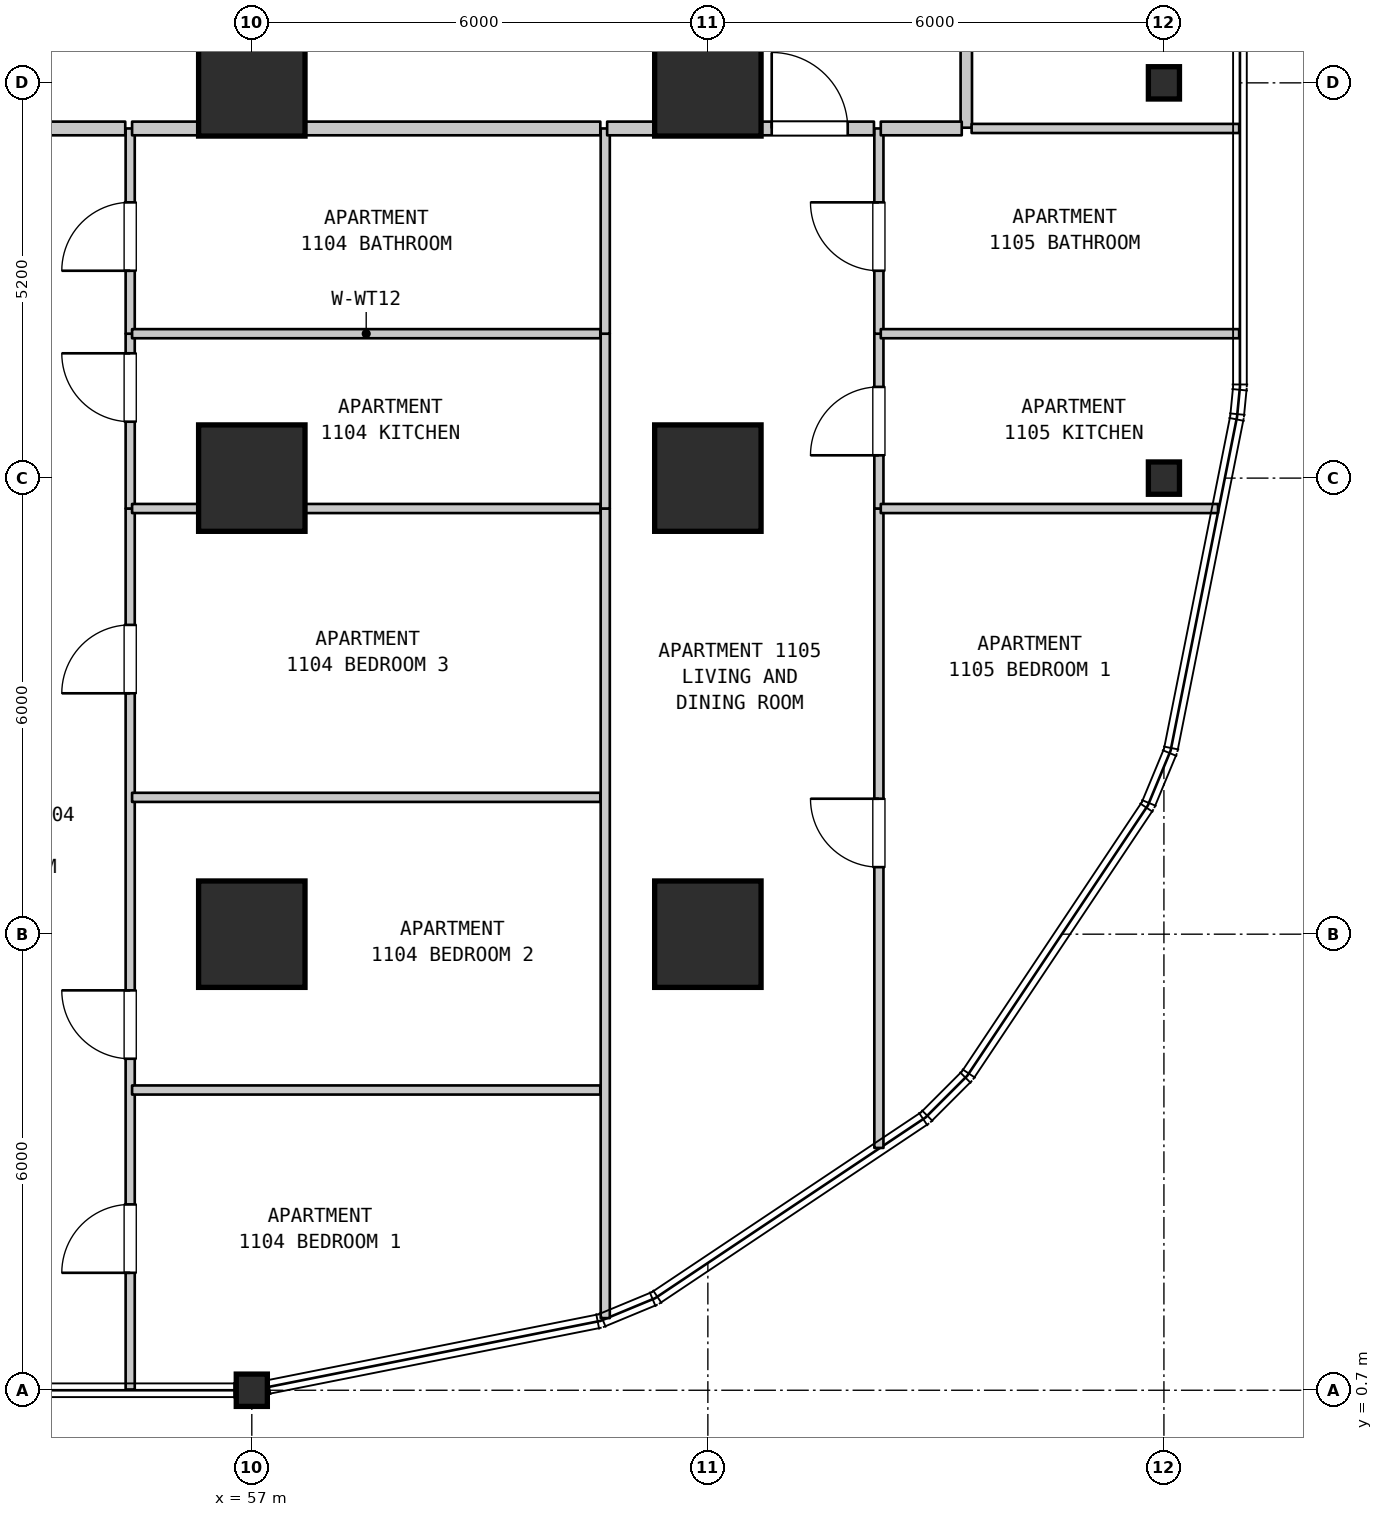
"""IFC4 building model, lengths in metres.
Left out: names, types, materials, properties, quantities, classifications, styles, units other than length and angle.
Written with IfcOpenShell. Run it as: python <this file> out.ifc"""

import sys

from ifc_helpers import new_model, si_unit, direction, frame, frame_2d, origin, origin_2d, place, context, subcontext, project, spatial, rectangle, i_section, extrude, element, fill, save


model = new_model("IFC4")
c1 = context("Model", 3, precision=1e-05, world=origin(), true_north=direction((0.0, 1.0)))
c2 = subcontext(c1, "Body", "Model", "MODEL_VIEW")
j1 = project(units=[si_unit("LENGTHUNIT", "METRE"), si_unit("PLANEANGLEUNIT", "RADIAN")], contexts=[c1])
p1 = place(None, origin())
s1 = spatial("IfcSite", under=j1, at=p1, CompositionType="ELEMENT")
p2 = place(p1, origin())
s2 = spatial("IfcBuilding", under=s1, at=p2, CompositionType="ELEMENT")
p3 = place(p2, frame((0.0, 0.0, 49.9)))
s3 = spatial("IfcBuildingStorey", under=s2, at=p3, CompositionType="ELEMENT", Elevation=49.9)
p4 = place(p3, frame((57.0, 0.7, 0.0), z_axis=(0.0, 0.0, 1.0), x_axis=(1.0, 0.0, 0.0)))
e1 = element("IfcColumn", 1, at=p4, inside=s3, PredefinedType="COLUMN", context=c2, shape_type="SweptSolid", body=[
    extrude(i_section(OverallWidth=0.409, OverallDepth=0.425, WebThickness=0.032, FlangeThickness=0.052, FilletRadius=0.015, at=origin_2d()), origin(), (0.0, 0.0, 1.0), 3.7),
])
for number, where, z_axis, x_axis in (
    (2, (57.0, 6.7, 0.0), (0.0, 0.0, 1.0), (1.0, 0.0, 0.0)),
    (3, (57.0, 12.7, 0.0), (0.0, 0.0, 1.0), (1.0, 0.0, 0.0)),
    (4, (57.0, 17.9, 0.0), (0.0, 0.0, 1.0), (1.0, 0.0, 0.0)),
    (5, (63.0, 6.7, 0.0), (0.0, 0.0, 1.0), (1.0, 0.0, 0.0)),
    (6, (63.0, 12.7, 0.0), (0.0, 0.0, 1.0), (1.0, 0.0, 0.0)),
    (7, (63.0, 17.9, 0.0), (0.0, 0.0, 1.0), (1.0, 0.0, 0.0)),
):
    element("IfcColumn", number, at=place(p3, frame(where, z_axis=z_axis, x_axis=x_axis)), inside=s3, PredefinedType="COLUMN", context=c2, shape_type="SweptSolid", body=[
        extrude(rectangle(XDim=1.4, YDim=1.4, at=origin_2d()), origin(), (0.0, 0.0, 1.0), 3.7),
    ])
for number, where, z_axis, x_axis in (
    (8, (69.0, 12.7, 0.0), (0.0, 0.0, 1.0), (1.0, 0.0, 0.0)),
    (9, (69.0, 17.9, 0.0), (0.0, 0.0, 1.0), (1.0, 0.0, 0.0)),
):
    element("IfcColumn", number, at=place(p3, frame(where, z_axis=z_axis, x_axis=x_axis)), inside=s3, PredefinedType="COLUMN", context=c2, shape_type="SweptSolid", body=[
        extrude(i_section(OverallWidth=0.409, OverallDepth=0.425, WebThickness=0.032, FlangeThickness=0.052, FilletRadius=0.015, at=origin_2d()), origin(), (0.0, 0.0, 1.0), 3.7),
    ])
p5 = place(p3, frame((55.4, 0.71, 0.0), z_axis=(0.0, 0.0, 1.0), x_axis=(0.0, 1.0, 0.0)))
e10 = element("IfcWall", 10, at=p5, inside=s3, PredefinedType="PARTITIONING", context=c2, shape_type="SweptSolid", body=[
    extrude(rectangle(XDim=11.59, YDim=0.12, at=frame_2d((5.795, 0.0))), origin(), (0.0, 0.0, 1.0), 3.385),
])
p6 = place(p5, frame((1.535, 0.0, 0.0)))
e11 = element("IfcOpeningElement", 11, at=p6, cuts=e10, PredefinedType="OPENING", context=c2, shape_type="SweptSolid", body=[
    extrude(rectangle(XDim=0.9, YDim=2.15, at=frame_2d((0.45, 1.075))), frame((0.0, 0.07, 0.0), z_axis=(0.0, -1.0, 0.0), x_axis=(1.0, 0.0, 0.0)), (0.0, 0.0, 1.0), 0.14),
])
p7 = place(p5, frame((4.351, 0.0, 0.0)))
e12 = element("IfcOpeningElement", 12, at=p7, cuts=e10, PredefinedType="OPENING", context=c2, shape_type="SweptSolid", body=[
    extrude(rectangle(XDim=0.9, YDim=2.15, at=frame_2d((0.45, 1.075))), frame((0.0, 0.07, 0.0), z_axis=(0.0, -1.0, 0.0), x_axis=(1.0, 0.0, 0.0)), (0.0, 0.0, 1.0), 0.14),
])
p8 = place(p5, frame((9.159, 0.0, 0.0)))
e13 = element("IfcOpeningElement", 13, at=p8, cuts=e10, PredefinedType="OPENING", context=c2, shape_type="SweptSolid", body=[
    extrude(rectangle(XDim=0.9, YDim=2.15, at=frame_2d((0.45, 1.075))), frame((0.0, 0.07, 0.0), z_axis=(0.0, -1.0, 0.0), x_axis=(1.0, 0.0, 0.0)), (0.0, 0.0, 1.0), 0.14),
])
p9 = place(p3, frame((55.4, 12.3, 0.0), z_axis=(0.0, 0.0, 1.0), x_axis=(0.0, 1.0, 0.0)))
e14 = element("IfcWall", 14, at=p9, inside=s3, PredefinedType="PARTITIONING", context=c2, shape_type="SweptSolid", body=[
    extrude(rectangle(XDim=2.3, YDim=0.12, at=frame_2d((1.15, 0.0))), origin(), (0.0, 0.0, 1.0), 3.385),
])
p10 = place(p9, frame((1.142, 0.0, 0.0)))
e15 = element("IfcOpeningElement", 15, at=p10, cuts=e14, PredefinedType="OPENING", context=c2, shape_type="SweptSolid", body=[
    extrude(rectangle(XDim=0.9, YDim=2.15, at=frame_2d((0.45, 1.075))), frame((0.0, 0.07, 0.0), z_axis=(0.0, -1.0, 0.0), x_axis=(1.0, 0.0, 0.0)), (0.0, 0.0, 1.0), 0.14),
])
p11 = place(p3, frame((55.4, 14.6, 0.0), z_axis=(0.0, 0.0, 1.0), x_axis=(0.0, 1.0, 0.0)))
e16 = element("IfcWall", 16, at=p11, inside=s3, PredefinedType="PARTITIONING", context=c2, shape_type="SweptSolid", body=[
    extrude(rectangle(XDim=2.7, YDim=0.12, at=frame_2d((1.35, 0.0))), origin(), (0.0, 0.0, 1.0), 3.385),
])
p12 = place(p11, frame((0.828, 0.0, 0.0)))
e17 = element("IfcOpeningElement", 17, at=p12, cuts=e16, PredefinedType="OPENING", context=c2, shape_type="SweptSolid", body=[
    extrude(rectangle(XDim=0.9, YDim=2.1, at=frame_2d((0.45, 1.05))), frame((0.0, 0.07, 0.0), z_axis=(0.0, -1.0, 0.0), x_axis=(1.0, 0.0, 0.0)), (0.0, 0.0, 1.0), 0.14),
])
p13 = place(p3, frame((61.65, 1.649, 0.0), z_axis=(0.0, 0.0, 1.0), x_axis=(0.0, 1.0, 0.0)))
e18 = element("IfcWall", 18, at=p13, inside=s3, PredefinedType="PARTITIONING", context=c2, shape_type="SweptSolid", body=[
    extrude(rectangle(XDim=10.651, YDim=0.12, at=frame_2d((5.326, 0.0))), origin(), (0.0, 0.0, 1.0), 3.385),
])
p14 = place(p3, frame((61.65, 12.3, 0.0), z_axis=(0.0, 0.0, 1.0), x_axis=(0.0, 1.0, 0.0)))
e19 = element("IfcWall", 19, at=p14, inside=s3, PredefinedType="PARTITIONING", context=c2, shape_type="SweptSolid", body=[
    extrude(rectangle(XDim=2.3, YDim=0.12, at=frame_2d((1.15, 0.0))), origin(), (0.0, 0.0, 1.0), 3.385),
])
p15 = place(p3, frame((61.65, 14.6, 0.0), z_axis=(0.0, 0.0, 1.0), x_axis=(0.0, 1.0, 0.0)))
e20 = element("IfcWall", 20, at=p15, inside=s3, PredefinedType="PARTITIONING", context=c2, shape_type="SweptSolid", body=[
    extrude(rectangle(XDim=2.7, YDim=0.12, at=frame_2d((1.35, 0.0))), origin(), (0.0, 0.0, 1.0), 3.385),
])
p16 = place(p3, frame((65.25, 3.888, 0.0), z_axis=(0.0, 0.0, 1.0), x_axis=(0.0, 1.0, 0.0)))
e21 = element("IfcWall", 21, at=p16, inside=s3, PredefinedType="PARTITIONING", context=c2, shape_type="SweptSolid", body=[
    extrude(rectangle(XDim=8.412, YDim=0.12, at=frame_2d((4.206, 0.0))), origin(), (0.0, 0.0, 1.0), 3.385),
])
p17 = place(p16, frame((3.694, 0.0, 0.0)))
e22 = element("IfcOpeningElement", 22, at=p17, cuts=e21, PredefinedType="OPENING", context=c2, shape_type="SweptSolid", body=[
    extrude(rectangle(XDim=0.9, YDim=2.15, at=frame_2d((0.45, 1.075))), frame((0.0, 0.07, 0.0), z_axis=(0.0, -1.0, 0.0), x_axis=(1.0, 0.0, 0.0)), (0.0, 0.0, 1.0), 0.14),
])
p18 = place(p3, frame((65.25, 12.3, 0.0), z_axis=(0.0, 0.0, 1.0), x_axis=(0.0, 1.0, 0.0)))
e23 = element("IfcWall", 23, at=p18, inside=s3, PredefinedType="PARTITIONING", context=c2, shape_type="SweptSolid", body=[
    extrude(rectangle(XDim=2.3, YDim=0.12, at=frame_2d((1.15, 0.0))), origin(), (0.0, 0.0, 1.0), 3.385),
])
p19 = place(p18, frame((0.7, 0.0, 0.0)))
e24 = element("IfcOpeningElement", 24, at=p19, cuts=e23, PredefinedType="OPENING", context=c2, shape_type="SweptSolid", body=[
    extrude(rectangle(XDim=0.9, YDim=2.15, at=frame_2d((0.45, 1.075))), frame((0.0, 0.07, 0.0), z_axis=(0.0, -1.0, 0.0), x_axis=(1.0, 0.0, 0.0)), (0.0, 0.0, 1.0), 0.14),
])
p20 = place(p3, frame((65.25, 14.6, 0.0), z_axis=(0.0, 0.0, 1.0), x_axis=(0.0, 1.0, 0.0)))
e25 = element("IfcWall", 25, at=p20, inside=s3, PredefinedType="PARTITIONING", context=c2, shape_type="SweptSolid", body=[
    extrude(rectangle(XDim=2.7, YDim=0.12, at=frame_2d((1.35, 0.0))), origin(), (0.0, 0.0, 1.0), 3.385),
])
p21 = place(p20, frame((0.828, 0.0, 0.0)))
e26 = element("IfcOpeningElement", 26, at=p21, cuts=e25, PredefinedType="OPENING", context=c2, shape_type="SweptSolid", body=[
    extrude(rectangle(XDim=0.9, YDim=2.1, at=frame_2d((0.45, 1.05))), frame((0.0, 0.07, 0.0), z_axis=(0.0, -1.0, 0.0), x_axis=(1.0, 0.0, 0.0)), (0.0, 0.0, 1.0), 0.14),
])
p22 = place(p3, frame((66.4, 17.31, 0.0), z_axis=(0.0, 0.0, 1.0), x_axis=(0.0, 1.0, 0.0)))
e27 = element("IfcWall", 27, at=p22, inside=s3, PredefinedType="STANDARD", context=c2, shape_type="SweptSolid", body=[
    extrude(rectangle(XDim=2.34, YDim=0.15, at=frame_2d((1.17, 0.0))), origin(), (0.0, 0.0, 1.0), 3.385),
])
for number, where, z_axis, x_axis in (
    (28, (55.425, 4.65, 0.0), (0.0, 0.0, 1.0), (1.0, 0.0, 0.0)),
    (29, (55.425, 8.5, 0.0), (0.0, 0.0, 1.0), (1.0, 0.0, 0.0)),
    (30, (55.425, 12.3, 0.0), (0.0, 0.0, 1.0), (1.0, 0.0, 0.0)),
):
    element("IfcWall", number, at=place(p3, frame(where, z_axis=z_axis, x_axis=x_axis)), inside=s3, PredefinedType="PARTITIONING", context=c2, shape_type="SweptSolid", body=[
        extrude(rectangle(XDim=6.16, YDim=0.12, at=frame_2d((3.08, 0.0))), origin(), (0.0, 0.0, 1.0), 3.385),
    ])
p23 = place(p3, frame((65.275, 12.3, 0.0), z_axis=(0.0, 0.0, 1.0), x_axis=(1.0, 0.0, 0.0)))
e31 = element("IfcWall", 31, at=p23, inside=s3, PredefinedType="PARTITIONING", context=c2, shape_type="SweptSolid", body=[
    extrude(rectangle(XDim=4.437, YDim=0.12, at=frame_2d((2.219, 0.0))), origin(), (0.0, 0.0, 1.0), 3.385),
])
p24 = place(p3, frame((55.425, 14.6, 0.0), z_axis=(0.0, 0.0, 1.0), x_axis=(1.0, 0.0, 0.0)))
e32 = element("IfcWall", 32, at=p24, inside=s3, PredefinedType="PARTITIONING", context=c2, shape_type="SweptSolid", body=[
    extrude(rectangle(XDim=6.16, YDim=0.12, at=frame_2d((3.08, 0.0))), origin(), (0.0, 0.0, 1.0), 3.385),
])
p25 = place(p3, frame((65.275, 14.6, 0.0), z_axis=(0.0, 0.0, 1.0), x_axis=(1.0, 0.0, 0.0)))
e33 = element("IfcWall", 33, at=p25, inside=s3, PredefinedType="PARTITIONING", context=c2, shape_type="SweptSolid", body=[
    extrude(rectangle(XDim=4.715, YDim=0.12, at=frame_2d((2.357, 0.0))), origin(), (0.0, 0.0, 1.0), 3.385),
])
p26 = place(p3, frame((51.375, 17.3, 0.0), z_axis=(0.0, 0.0, 1.0), x_axis=(1.0, 0.0, 0.0)))
e34 = element("IfcWall", 34, at=p26, inside=s3, PredefinedType="STANDARD", context=c2, shape_type="SweptSolid", body=[
    extrude(rectangle(XDim=3.96, YDim=0.18, at=frame_2d((1.98, 0.0))), origin(), (0.0, 0.0, 1.0), 3.385),
])
p27 = place(p26, frame((1.609, 0.0, 0.0)))
e35 = element("IfcOpeningElement", 35, at=p27, cuts=e34, PredefinedType="OPENING", context=c2, shape_type="SweptSolid", body=[
    extrude(rectangle(XDim=1.0, YDim=2.15, at=frame_2d((0.5, 1.075))), frame((0.0, 0.1, 0.0), z_axis=(0.0, -1.0, 0.0), x_axis=(1.0, 0.0, 0.0)), (0.0, 0.0, 1.0), 0.2),
])
p28 = place(p3, frame((55.425, 17.3, 0.0), z_axis=(0.0, 0.0, 1.0), x_axis=(1.0, 0.0, 0.0)))
e36 = element("IfcWall", 36, at=p28, inside=s3, PredefinedType="STANDARD", context=c2, shape_type="SweptSolid", body=[
    extrude(rectangle(XDim=6.16, YDim=0.18, at=frame_2d((3.08, 0.0))), origin(), (0.0, 0.0, 1.0), 3.385),
])
p29 = place(p3, frame((61.675, 17.3, 0.0), z_axis=(0.0, 0.0, 1.0), x_axis=(1.0, 0.0, 0.0)))
e37 = element("IfcWall", 37, at=p29, inside=s3, PredefinedType="STANDARD", context=c2, shape_type="SweptSolid", body=[
    extrude(rectangle(XDim=3.51, YDim=0.18, at=frame_2d((1.755, 0.0))), origin(), (0.0, 0.0, 1.0), 3.385),
])
p30 = place(p29, frame((2.165, 0.0, 0.0)))
e38 = element("IfcOpeningElement", 38, at=p30, cuts=e37, PredefinedType="OPENING", context=c2, shape_type="SweptSolid", body=[
    extrude(rectangle(XDim=1.0, YDim=2.15, at=frame_2d((0.5, 1.075))), frame((0.0, 0.1, 0.0), z_axis=(0.0, -1.0, 0.0), x_axis=(1.0, 0.0, 0.0)), (0.0, 0.0, 1.0), 0.2),
])
p31 = place(p3, frame((65.275, 17.3, 0.0), z_axis=(0.0, 0.0, 1.0), x_axis=(1.0, 0.0, 0.0)))
e39 = element("IfcWall", 39, at=p31, inside=s3, PredefinedType="STANDARD", context=c2, shape_type="SweptSolid", body=[
    extrude(rectangle(XDim=1.065, YDim=0.18, at=frame_2d((0.533, 0.0))), origin(), (0.0, 0.0, 1.0), 3.385),
])
p32 = place(p3, frame((66.47, 17.3, 0.0), z_axis=(0.0, 0.0, 1.0), x_axis=(1.0, 0.0, 0.0)))
e40 = element("IfcWall", 40, at=p32, inside=s3, PredefinedType="PARTITIONING", context=c2, shape_type="SweptSolid", body=[
    extrude(rectangle(XDim=3.52, YDim=0.12, at=frame_2d((1.76, 0.0))), origin(), (0.0, 0.0, 1.0), 3.385),
])
p33 = place(p6, origin())
e41 = element("IfcDoor", 41, at=p33, inside=s3, OperationType="SINGLE_SWING_LEFT", PredefinedType="DOOR", context=c2, shape_type="SweptSolid", body=[
    extrude(rectangle(XDim=0.9, YDim=2.15, at=frame_2d((0.45, 1.075))), frame((0.0, 0.025, 0.0), z_axis=(0.0, -1.0, 0.0), x_axis=(1.0, 0.0, 0.0)), (0.0, 0.0, 1.0), 0.05),
])
fill(e11, e41)
p34 = place(p7, origin())
e42 = element("IfcDoor", 42, at=p34, inside=s3, OperationType="SINGLE_SWING_RIGHT", PredefinedType="DOOR", context=c2, shape_type="SweptSolid", body=[
    extrude(rectangle(XDim=0.9, YDim=2.15, at=frame_2d((0.45, 1.075))), frame((0.0, 0.025, 0.0), z_axis=(0.0, -1.0, 0.0), x_axis=(1.0, 0.0, 0.0)), (0.0, 0.0, 1.0), 0.05),
])
fill(e12, e42)
p35 = place(p8, origin())
e43 = element("IfcDoor", 43, at=p35, inside=s3, OperationType="SINGLE_SWING_LEFT", PredefinedType="DOOR", context=c2, shape_type="SweptSolid", body=[
    extrude(rectangle(XDim=0.9, YDim=2.15, at=frame_2d((0.45, 1.075))), frame((0.0, 0.025, 0.0), z_axis=(0.0, -1.0, 0.0), x_axis=(1.0, 0.0, 0.0)), (0.0, 0.0, 1.0), 0.05),
])
fill(e13, e43)
p36 = place(p10, origin())
e44 = element("IfcDoor", 44, at=p36, inside=s3, OperationType="SINGLE_SWING_RIGHT", PredefinedType="DOOR", context=c2, shape_type="SweptSolid", body=[
    extrude(rectangle(XDim=0.9, YDim=2.15, at=frame_2d((0.45, 1.075))), frame((0.0, 0.025, 0.0), z_axis=(0.0, -1.0, 0.0), x_axis=(1.0, 0.0, 0.0)), (0.0, 0.0, 1.0), 0.05),
])
fill(e15, e44)
p37 = place(p12, origin())
e45 = element("IfcDoor", 45, at=p37, inside=s3, OperationType="SINGLE_SWING_LEFT", PredefinedType="DOOR", context=c2, shape_type="SweptSolid", body=[
    extrude(rectangle(XDim=0.9, YDim=2.1, at=frame_2d((0.45, 1.05))), frame((0.0, 0.025, 0.0), z_axis=(0.0, -1.0, 0.0), x_axis=(1.0, 0.0, 0.0)), (0.0, 0.0, 1.0), 0.05),
])
fill(e17, e45)
p38 = place(p17, origin())
e46 = element("IfcDoor", 46, at=p38, inside=s3, OperationType="SINGLE_SWING_RIGHT", PredefinedType="DOOR", context=c2, shape_type="SweptSolid", body=[
    extrude(rectangle(XDim=0.9, YDim=2.15, at=frame_2d((0.45, 1.075))), frame((0.0, 0.025, 0.0), z_axis=(0.0, -1.0, 0.0), x_axis=(1.0, 0.0, 0.0)), (0.0, 0.0, 1.0), 0.05),
])
fill(e22, e46)
p39 = place(p19, origin())
e47 = element("IfcDoor", 47, at=p39, inside=s3, OperationType="SINGLE_SWING_LEFT", PredefinedType="DOOR", context=c2, shape_type="SweptSolid", body=[
    extrude(rectangle(XDim=0.9, YDim=2.15, at=frame_2d((0.45, 1.075))), frame((0.0, 0.025, 0.0), z_axis=(0.0, -1.0, 0.0), x_axis=(1.0, 0.0, 0.0)), (0.0, 0.0, 1.0), 0.05),
])
fill(e24, e47)
p40 = place(p21, origin())
e48 = element("IfcDoor", 48, at=p40, inside=s3, OperationType="SINGLE_SWING_RIGHT", PredefinedType="DOOR", context=c2, shape_type="SweptSolid", body=[
    extrude(rectangle(XDim=0.9, YDim=2.1, at=frame_2d((0.45, 1.05))), frame((0.0, 0.025, 0.0), z_axis=(0.0, -1.0, 0.0), x_axis=(1.0, 0.0, 0.0)), (0.0, 0.0, 1.0), 0.05),
])
fill(e26, e48)
p41 = place(p30, origin())
e49 = element("IfcDoor", 49, at=p41, inside=s3, OperationType="SINGLE_SWING_LEFT", PredefinedType="DOOR", context=c2, shape_type="SweptSolid", body=[
    extrude(rectangle(XDim=1.0, YDim=2.15, at=frame_2d((0.5, 1.075))), frame((0.0, 0.025, 0.0), z_axis=(0.0, -1.0, 0.0), x_axis=(1.0, 0.0, 0.0)), (0.0, 0.0, 1.0), 0.05),
])
fill(e38, e49)
save(model, sys.argv[1])
